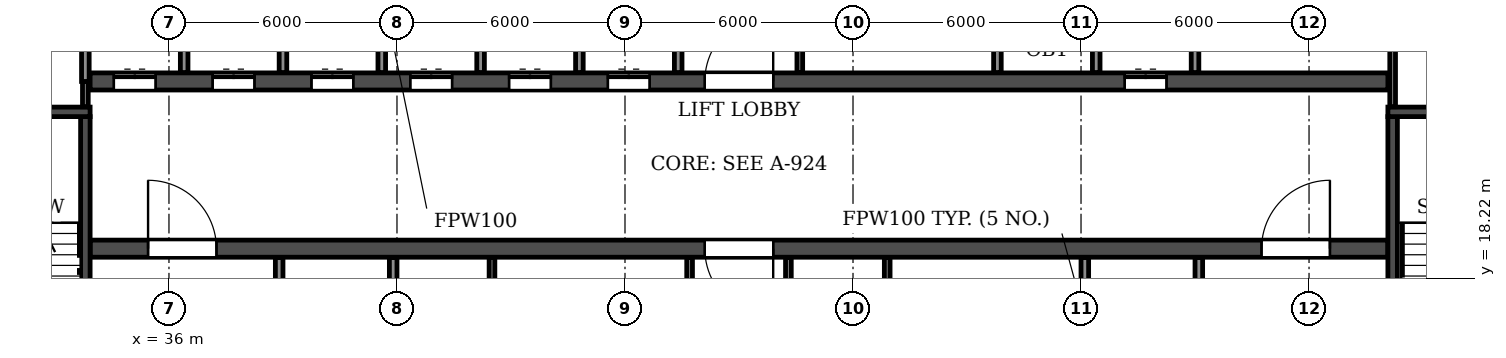
"""IFC4 building model, lengths in metres.
Left out: names, types, materials, properties, quantities, classifications, styles, units other than length and angle.
Written with IfcOpenShell. Run it as: python <this file> out.ifc"""

import sys

from ifc_helpers import new_model, si_unit, direction, frame, frame_2d, origin, place, context, subcontext, project, spatial, rectangle, extrude, element, fill, save


model = new_model("IFC4")
c1 = context("Model", 3, precision=1e-05, world=origin(), true_north=direction((0.0, 1.0)))
c2 = subcontext(c1, "Body", "Model", "MODEL_VIEW")
j1 = project(units=[si_unit("LENGTHUNIT", "METRE"), si_unit("PLANEANGLEUNIT", "RADIAN")], contexts=[c1])
p1 = place(None, origin())
s1 = spatial("IfcSite", under=j1, at=p1, CompositionType="ELEMENT")
p2 = place(p1, origin())
s2 = spatial("IfcBuilding", under=s1, at=p2, CompositionType="ELEMENT")
p3 = place(p2, frame((0.0, 0.0, 125.7)))
s3 = spatial("IfcBuildingStorey", under=s2, at=p3, CompositionType="ELEMENT", Elevation=125.7)
p4 = place(p3, frame((33.925, 19.0, 0.0), z_axis=(0.0, 0.0, 1.0), x_axis=(1.0, 0.0, 0.0)))
e1 = element("IfcWall", 1, at=p4, inside=s3, PredefinedType="SOLIDWALL", context=c2, shape_type="SweptSolid", body=[
    extrude(rectangle(XDim=34.15, YDim=0.45, at=frame_2d((17.075, 0.0))), origin(), (0.0, 0.0, 1.0), 3.07),
])
p5 = place(p4, frame((16.175, 0.0, 0.0)))
e2 = element("IfcOpeningElement", 2, at=p5, cuts=e1, PredefinedType="OPENING", context=c2, shape_type="SweptSolid", body=[
    extrude(rectangle(XDim=1.8, YDim=2.1, at=frame_2d((0.9, 1.05))), frame((0.0, 0.235, 0.0), z_axis=(0.0, -1.0, 0.0), x_axis=(1.0, 0.0, 0.0)), (0.0, 0.0, 1.0), 0.47),
])
p6 = place(p4, frame((1.525, 0.0, 0.0)))
e3 = element("IfcOpeningElement", 3, at=p6, cuts=e1, PredefinedType="OPENING", context=c2, shape_type="SweptSolid", body=[
    extrude(rectangle(XDim=1.8, YDim=2.1, at=frame_2d((0.9, 1.05))), frame((0.0, 0.235, 0.0), z_axis=(0.0, -1.0, 0.0), x_axis=(1.0, 0.0, 0.0)), (0.0, 0.0, 1.0), 0.47),
])
p7 = place(p4, frame((30.825, 0.0, 0.0)))
e4 = element("IfcOpeningElement", 4, at=p7, cuts=e1, PredefinedType="OPENING", context=c2, shape_type="SweptSolid", body=[
    extrude(rectangle(XDim=1.8, YDim=2.1, at=frame_2d((0.9, 1.05))), frame((0.0, 0.235, 0.0), z_axis=(0.0, -1.0, 0.0), x_axis=(1.0, 0.0, 0.0)), (0.0, 0.0, 1.0), 0.47),
])
p8 = place(p3, frame((33.925, 23.4, 0.0), z_axis=(0.0, 0.0, 1.0), x_axis=(1.0, 0.0, 0.0)))
e5 = element("IfcWall", 5, at=p8, inside=s3, PredefinedType="SOLIDWALL", context=c2, shape_type="SweptSolid", body=[
    extrude(rectangle(XDim=34.15, YDim=0.45, at=frame_2d((17.075, 0.0))), origin(), (0.0, 0.0, 1.0), 3.07),
])
p9 = place(p8, frame((16.175, 0.0, 0.0)))
e6 = element("IfcOpeningElement", 6, at=p9, cuts=e5, PredefinedType="OPENING", context=c2, shape_type="SweptSolid", body=[
    extrude(rectangle(XDim=1.8, YDim=2.1, at=frame_2d((0.9, 1.05))), frame((0.0, 0.235, 0.0), z_axis=(0.0, -1.0, 0.0), x_axis=(1.0, 0.0, 0.0)), (0.0, 0.0, 1.0), 0.47),
])
p10 = place(p8, frame((0.625, 0.0, 0.0)))
e7 = element("IfcOpeningElement", 7, at=p10, cuts=e5, PredefinedType="OPENING", context=c2, shape_type="SweptSolid", body=[
    extrude(rectangle(XDim=1.1, YDim=2.1, at=frame_2d((0.55, 1.05))), frame((0.0, 0.235, 0.0), z_axis=(0.0, -1.0, 0.0), x_axis=(1.0, 0.0, 0.0)), (0.0, 0.0, 1.0), 0.47),
])
p11 = place(p8, frame((3.225, 0.0, 0.0)))
e8 = element("IfcOpeningElement", 8, at=p11, cuts=e5, PredefinedType="OPENING", context=c2, shape_type="SweptSolid", body=[
    extrude(rectangle(XDim=1.1, YDim=2.1, at=frame_2d((0.55, 1.05))), frame((0.0, 0.235, 0.0), z_axis=(0.0, -1.0, 0.0), x_axis=(1.0, 0.0, 0.0)), (0.0, 0.0, 1.0), 0.47),
])
p12 = place(p8, frame((5.825, 0.0, 0.0)))
e9 = element("IfcOpeningElement", 9, at=p12, cuts=e5, PredefinedType="OPENING", context=c2, shape_type="SweptSolid", body=[
    extrude(rectangle(XDim=1.1, YDim=2.1, at=frame_2d((0.55, 1.05))), frame((0.0, 0.235, 0.0), z_axis=(0.0, -1.0, 0.0), x_axis=(1.0, 0.0, 0.0)), (0.0, 0.0, 1.0), 0.47),
])
p13 = place(p8, frame((8.425, 0.0, 0.0)))
e10 = element("IfcOpeningElement", 10, at=p13, cuts=e5, PredefinedType="OPENING", context=c2, shape_type="SweptSolid", body=[
    extrude(rectangle(XDim=1.1, YDim=2.1, at=frame_2d((0.55, 1.05))), frame((0.0, 0.235, 0.0), z_axis=(0.0, -1.0, 0.0), x_axis=(1.0, 0.0, 0.0)), (0.0, 0.0, 1.0), 0.47),
])
p14 = place(p8, frame((11.025, 0.0, 0.0)))
e11 = element("IfcOpeningElement", 11, at=p14, cuts=e5, PredefinedType="OPENING", context=c2, shape_type="SweptSolid", body=[
    extrude(rectangle(XDim=1.1, YDim=2.1, at=frame_2d((0.55, 1.05))), frame((0.0, 0.235, 0.0), z_axis=(0.0, -1.0, 0.0), x_axis=(1.0, 0.0, 0.0)), (0.0, 0.0, 1.0), 0.47),
])
p15 = place(p8, frame((13.625, 0.0, 0.0)))
e12 = element("IfcOpeningElement", 12, at=p15, cuts=e5, PredefinedType="OPENING", context=c2, shape_type="SweptSolid", body=[
    extrude(rectangle(XDim=1.1, YDim=2.1, at=frame_2d((0.55, 1.05))), frame((0.0, 0.235, 0.0), z_axis=(0.0, -1.0, 0.0), x_axis=(1.0, 0.0, 0.0)), (0.0, 0.0, 1.0), 0.47),
])
p16 = place(p8, frame((27.225, 0.0, 0.0)))
e13 = element("IfcOpeningElement", 13, at=p16, cuts=e5, PredefinedType="OPENING", context=c2, shape_type="SweptSolid", body=[
    extrude(rectangle(XDim=1.1, YDim=2.1, at=frame_2d((0.55, 1.05))), frame((0.0, 0.235, 0.0), z_axis=(0.0, -1.0, 0.0), x_axis=(1.0, 0.0, 0.0)), (0.0, 0.0, 1.0), 0.47),
])
p17 = place(p3, frame((33.8, 14.825, 0.0), z_axis=(0.0, 0.0, 1.0), x_axis=(0.0, 1.0, 0.0)))
e14 = element("IfcWall", 14, at=p17, inside=s3, PredefinedType="SOLIDWALL", context=c2, shape_type="SweptSolid", body=[
    extrude(rectangle(XDim=7.65, YDim=0.25, at=frame_2d((3.825, 0.0))), origin(), (0.0, 0.0, 1.0), 3.07),
])
p18 = place(p17, frame((0.475, 0.0, 0.0)))
e15 = element("IfcOpeningElement", 15, at=p18, cuts=e14, PredefinedType="OPENING", context=c2, shape_type="SweptSolid", body=[
    extrude(rectangle(XDim=1.0, YDim=2.1, at=frame_2d((0.5, 1.05))), frame((0.0, 0.135, 0.0), z_axis=(0.0, -1.0, 0.0), x_axis=(1.0, 0.0, 0.0)), (0.0, 0.0, 1.0), 0.27),
])
p19 = place(p3, frame((29.875, 22.6, 0.0), z_axis=(0.0, 0.0, 1.0), x_axis=(1.0, 0.0, 0.0)))
e16 = element("IfcWall", 16, at=p19, inside=s3, PredefinedType="SOLIDWALL", context=c2, shape_type="SweptSolid", body=[
    extrude(rectangle(XDim=4.05, YDim=0.25, at=frame_2d((2.025, 0.0))), origin(), (0.0, 0.0, 1.0), 3.07),
])
p20 = place(p3, frame((68.2, 14.825, 0.0), z_axis=(0.0, 0.0, 1.0), x_axis=(0.0, 1.0, 0.0)))
e17 = element("IfcWall", 17, at=p20, inside=s3, PredefinedType="SOLIDWALL", context=c2, shape_type="SweptSolid", body=[
    extrude(rectangle(XDim=7.65, YDim=0.25, at=frame_2d((3.825, 0.0))), origin(), (0.0, 0.0, 1.0), 3.07),
])
p21 = place(p20, frame((0.475, 0.0, 0.0)))
e18 = element("IfcOpeningElement", 18, at=p21, cuts=e17, PredefinedType="OPENING", context=c2, shape_type="SweptSolid", body=[
    extrude(rectangle(XDim=1.0, YDim=2.1, at=frame_2d((0.5, 1.05))), frame((0.0, 0.135, 0.0), z_axis=(0.0, -1.0, 0.0), x_axis=(1.0, 0.0, 0.0)), (0.0, 0.0, 1.0), 0.27),
])
p22 = place(p3, frame((68.075, 22.6, 0.0), z_axis=(0.0, 0.0, 1.0), x_axis=(1.0, 0.0, 0.0)))
e19 = element("IfcWall", 19, at=p22, inside=s3, PredefinedType="SOLIDWALL", context=c2, shape_type="SweptSolid", body=[
    extrude(rectangle(XDim=4.05, YDim=0.25, at=frame_2d((2.025, 0.0))), origin(), (0.0, 0.0, 1.0), 3.07),
])
for number, where, z_axis, x_axis in (
    (20, (49.7, 14.835, 0.0), (0.0, 0.0, 1.0), (0.0, 1.0, 0.0)),
    (21, (52.3, 14.835, 0.0), (0.0, 0.0, 1.0), (0.0, 1.0, 0.0)),
    (22, (52.6, 23.635, 0.0), (0.0, 0.0, 1.0), (0.0, 1.0, 0.0)),
    (23, (44.5, 14.835, 0.0), (0.0, 0.0, 1.0), (0.0, 1.0, 0.0)),
    (24, (54.9, 14.835, 0.0), (0.0, 0.0, 1.0), (0.0, 1.0, 0.0)),
):
    element("IfcWall", number, at=place(p3, frame(where, z_axis=z_axis, x_axis=x_axis)), inside=s3, PredefinedType="PARTITIONING", context=c2, shape_type="SweptSolid", body=[
        extrude(rectangle(XDim=3.93, YDim=0.15, at=frame_2d((1.965, 0.0))), origin(), (0.0, 0.0, 1.0), 3.07),
    ])
p23 = place(p3, frame((33.8, 22.735, 0.0), z_axis=(0.0, 0.0, 1.0), x_axis=(0.0, 1.0, 0.0)))
e25 = element("IfcWall", 25, at=p23, inside=s3, PredefinedType="PARTITIONING", context=c2, shape_type="SweptSolid", body=[
    extrude(rectangle(XDim=0.665, YDim=0.15, at=frame_2d((0.333, 0.0))), origin(), (0.0, 0.0, 1.0), 3.07),
])
p24 = place(p3, frame((68.2, 22.735, 0.0), z_axis=(0.0, 0.0, 1.0), x_axis=(0.0, 1.0, 0.0)))
e26 = element("IfcWall", 26, at=p24, inside=s3, PredefinedType="PARTITIONING", context=c2, shape_type="SweptSolid", body=[
    extrude(rectangle(XDim=4.83, YDim=0.15, at=frame_2d((2.415, 0.0))), origin(), (0.0, 0.0, 1.0), 3.07),
])
p25 = place(p3, frame((33.8, 23.4, 0.0), z_axis=(0.0, 0.0, 1.0), x_axis=(0.0, 1.0, 0.0)))
e27 = element("IfcWall", 27, at=p25, inside=s3, PredefinedType="PARTITIONING", context=c2, shape_type="SweptSolid", body=[
    extrude(rectangle(XDim=2.7, YDim=0.2, at=frame_2d((1.35, 0.0))), origin(), (0.0, 0.0, 1.0), 3.07),
])
p26 = place(p3, frame((36.4, 23.635, 0.0), z_axis=(0.0, 0.0, 1.0), x_axis=(0.0, 1.0, 0.0)))
e28 = element("IfcWall", 28, at=p26, inside=s3, PredefinedType="PARTITIONING", context=c2, shape_type="SweptSolid", body=[
    extrude(rectangle(XDim=2.465, YDim=0.2, at=frame_2d((1.232, 0.0))), origin(), (0.0, 0.0, 1.0), 3.07),
])
p27 = place(p3, frame((38.9, 14.835, 0.0), z_axis=(0.0, 0.0, 1.0), x_axis=(0.0, 1.0, 0.0)))
e29 = element("IfcWall", 29, at=p27, inside=s3, PredefinedType="PARTITIONING", context=c2, shape_type="SweptSolid", body=[
    extrude(rectangle(XDim=3.93, YDim=0.2, at=frame_2d((1.965, 0.0))), origin(), (0.0, 0.0, 1.0), 3.07),
])
p28 = place(p27, frame((1.415, 0.0, 0.0)))
e30 = element("IfcOpeningElement", 30, at=p28, cuts=e29, PredefinedType="OPENING", context=c2, shape_type="SweptSolid", body=[
    extrude(rectangle(XDim=1.1, YDim=2.1, at=frame_2d((0.55, 1.05))), frame((0.0, 0.11, 0.0), z_axis=(0.0, -1.0, 0.0), x_axis=(1.0, 0.0, 0.0)), (0.0, 0.0, 1.0), 0.22),
])
for number, where, z_axis, x_axis in (
    (31, (39.0, 23.635, 0.0), (0.0, 0.0, 1.0), (0.0, 1.0, 0.0)),
    (32, (41.6, 23.635, 0.0), (0.0, 0.0, 1.0), (0.0, 1.0, 0.0)),
):
    element("IfcWall", number, at=place(p3, frame(where, z_axis=z_axis, x_axis=x_axis)), inside=s3, PredefinedType="PARTITIONING", context=c2, shape_type="SweptSolid", body=[
        extrude(rectangle(XDim=2.465, YDim=0.2, at=frame_2d((1.232, 0.0))), origin(), (0.0, 0.0, 1.0), 3.07),
    ])
for number, where, z_axis, x_axis in (
    (33, (41.9, 14.835, 0.0), (0.0, 0.0, 1.0), (0.0, 1.0, 0.0)),
    (34, (44.2, 23.635, 0.0), (0.0, 0.0, 1.0), (0.0, 1.0, 0.0)),
    (35, (46.8, 23.635, 0.0), (0.0, 0.0, 1.0), (0.0, 1.0, 0.0)),
):
    element("IfcWall", number, at=place(p3, frame(where, z_axis=z_axis, x_axis=x_axis)), inside=s3, PredefinedType="PARTITIONING", context=c2, shape_type="SweptSolid", body=[
        extrude(rectangle(XDim=3.93, YDim=0.2, at=frame_2d((1.965, 0.0))), origin(), (0.0, 0.0, 1.0), 3.07),
    ])
for number, where, z_axis, x_axis in (
    (36, (49.4, 23.635, 0.0), (0.0, 0.0, 1.0), (0.0, 1.0, 0.0)),
    (37, (57.8, 23.635, 0.0), (0.0, 0.0, 1.0), (0.0, 1.0, 0.0)),
):
    element("IfcWall", number, at=place(p3, frame(where, z_axis=z_axis, x_axis=x_axis)), inside=s3, PredefinedType="PARTITIONING", context=c2, shape_type="SweptSolid", body=[
        extrude(rectangle(XDim=2.465, YDim=0.2, at=frame_2d((1.232, 0.0))), origin(), (0.0, 0.0, 1.0), 3.07),
    ])
p29 = place(p3, frame((60.1, 14.835, 0.0), z_axis=(0.0, 0.0, 1.0), x_axis=(0.0, 1.0, 0.0)))
e38 = element("IfcWall", 38, at=p29, inside=s3, PredefinedType="PARTITIONING", context=c2, shape_type="SweptSolid", body=[
    extrude(rectangle(XDim=3.93, YDim=0.2, at=frame_2d((1.965, 0.0))), origin(), (0.0, 0.0, 1.0), 3.07),
])
for number, where, z_axis, x_axis in (
    (39, (60.4, 23.635, 0.0), (0.0, 0.0, 1.0), (0.0, 1.0, 0.0)),
    (40, (63.0, 23.635, 0.0), (0.0, 0.0, 1.0), (0.0, 1.0, 0.0)),
):
    element("IfcWall", number, at=place(p3, frame(where, z_axis=z_axis, x_axis=x_axis)), inside=s3, PredefinedType="PARTITIONING", context=c2, shape_type="SweptSolid", body=[
        extrude(rectangle(XDim=2.465, YDim=0.2, at=frame_2d((1.232, 0.0))), origin(), (0.0, 0.0, 1.0), 3.07),
    ])
p30 = place(p3, frame((63.1, 14.835, 0.0), z_axis=(0.0, 0.0, 1.0), x_axis=(0.0, 1.0, 0.0)))
e41 = element("IfcWall", 41, at=p30, inside=s3, PredefinedType="PARTITIONING", context=c2, shape_type="SweptSolid", body=[
    extrude(rectangle(XDim=3.93, YDim=0.2, at=frame_2d((1.965, 0.0))), origin(), (0.0, 0.0, 1.0), 3.07),
])
p31 = place(p30, frame((1.415, 0.0, 0.0)))
e42 = element("IfcOpeningElement", 42, at=p31, cuts=e41, PredefinedType="OPENING", context=c2, shape_type="SweptSolid", body=[
    extrude(rectangle(XDim=1.1, YDim=2.1, at=frame_2d((0.55, 1.05))), frame((0.0, 0.11, 0.0), z_axis=(0.0, -1.0, 0.0), x_axis=(1.0, 0.0, 0.0)), (0.0, 0.0, 1.0), 0.22),
])
p32 = place(p9, origin())
e43 = element("IfcDoor", 43, at=p32, inside=s3, OperationType="DOUBLE_DOOR_SINGLE_SWING", PredefinedType="DOOR", context=c2, shape_type="SweptSolid", body=[
    extrude(rectangle(XDim=1.8, YDim=2.1, at=frame_2d((0.9, 1.05))), frame((0.0, 0.025, 0.0), z_axis=(0.0, -1.0, 0.0), x_axis=(1.0, 0.0, 0.0)), (0.0, 0.0, 1.0), 0.05),
])
fill(e6, e43)
p33 = place(p5, frame((1.8, 0.0, 0.0), z_axis=(0.0, 0.0, 1.0), x_axis=(-1.0, 0.0, 0.0)))
e44 = element("IfcDoor", 44, at=p33, inside=s3, OperationType="DOUBLE_DOOR_SINGLE_SWING", PredefinedType="DOOR", context=c2, shape_type="SweptSolid", body=[
    extrude(rectangle(XDim=1.8, YDim=2.1, at=frame_2d((0.9, 1.05))), frame((0.0, 0.025, 0.0), z_axis=(0.0, -1.0, 0.0), x_axis=(1.0, 0.0, 0.0)), (0.0, 0.0, 1.0), 0.05),
])
fill(e2, e44)
p34 = place(p10, origin())
e45 = element("IfcDoor", 45, at=p34, inside=s3, OperationType="DOUBLE_DOOR_SLIDING", PredefinedType="DOOR", context=c2, shape_type="SweptSolid", body=[
    extrude(rectangle(XDim=1.1, YDim=2.1, at=frame_2d((0.55, 1.05))), frame((0.0, 0.025, 0.0), z_axis=(0.0, -1.0, 0.0), x_axis=(1.0, 0.0, 0.0)), (0.0, 0.0, 1.0), 0.05),
])
fill(e7, e45)
p35 = place(p6, origin())
e46 = element("IfcDoor", 46, at=p35, inside=s3, OperationType="DOUBLE_DOOR_SINGLE_SWING", PredefinedType="DOOR", context=c2, shape_type="SweptSolid", body=[
    extrude(rectangle(XDim=1.8, YDim=2.1, at=frame_2d((0.9, 1.05))), frame((0.0, 0.025, 0.0), z_axis=(0.0, -1.0, 0.0), x_axis=(1.0, 0.0, 0.0)), (0.0, 0.0, 1.0), 0.05),
])
fill(e3, e46)
p36 = place(p11, origin())
e47 = element("IfcDoor", 47, at=p36, inside=s3, OperationType="DOUBLE_DOOR_SLIDING", PredefinedType="DOOR", context=c2, shape_type="SweptSolid", body=[
    extrude(rectangle(XDim=1.1, YDim=2.1, at=frame_2d((0.55, 1.05))), frame((0.0, 0.025, 0.0), z_axis=(0.0, -1.0, 0.0), x_axis=(1.0, 0.0, 0.0)), (0.0, 0.0, 1.0), 0.05),
])
fill(e8, e47)
p37 = place(p12, origin())
e48 = element("IfcDoor", 48, at=p37, inside=s3, OperationType="DOUBLE_DOOR_SLIDING", PredefinedType="DOOR", context=c2, shape_type="SweptSolid", body=[
    extrude(rectangle(XDim=1.1, YDim=2.1, at=frame_2d((0.55, 1.05))), frame((0.0, 0.025, 0.0), z_axis=(0.0, -1.0, 0.0), x_axis=(1.0, 0.0, 0.0)), (0.0, 0.0, 1.0), 0.05),
])
fill(e9, e48)
p38 = place(p13, origin())
e49 = element("IfcDoor", 49, at=p38, inside=s3, OperationType="DOUBLE_DOOR_SLIDING", PredefinedType="DOOR", context=c2, shape_type="SweptSolid", body=[
    extrude(rectangle(XDim=1.1, YDim=2.1, at=frame_2d((0.55, 1.05))), frame((0.0, 0.025, 0.0), z_axis=(0.0, -1.0, 0.0), x_axis=(1.0, 0.0, 0.0)), (0.0, 0.0, 1.0), 0.05),
])
fill(e10, e49)
p39 = place(p14, origin())
e50 = element("IfcDoor", 50, at=p39, inside=s3, OperationType="DOUBLE_DOOR_SLIDING", PredefinedType="DOOR", context=c2, shape_type="SweptSolid", body=[
    extrude(rectangle(XDim=1.1, YDim=2.1, at=frame_2d((0.55, 1.05))), frame((0.0, 0.025, 0.0), z_axis=(0.0, -1.0, 0.0), x_axis=(1.0, 0.0, 0.0)), (0.0, 0.0, 1.0), 0.05),
])
fill(e11, e50)
p40 = place(p15, origin())
e51 = element("IfcDoor", 51, at=p40, inside=s3, OperationType="DOUBLE_DOOR_SLIDING", PredefinedType="DOOR", context=c2, shape_type="SweptSolid", body=[
    extrude(rectangle(XDim=1.1, YDim=2.1, at=frame_2d((0.55, 1.05))), frame((0.0, 0.025, 0.0), z_axis=(0.0, -1.0, 0.0), x_axis=(1.0, 0.0, 0.0)), (0.0, 0.0, 1.0), 0.05),
])
fill(e12, e51)
p41 = place(p16, origin())
e52 = element("IfcDoor", 52, at=p41, inside=s3, OperationType="DOUBLE_DOOR_SLIDING", PredefinedType="DOOR", context=c2, shape_type="SweptSolid", body=[
    extrude(rectangle(XDim=1.1, YDim=2.1, at=frame_2d((0.55, 1.05))), frame((0.0, 0.025, 0.0), z_axis=(0.0, -1.0, 0.0), x_axis=(1.0, 0.0, 0.0)), (0.0, 0.0, 1.0), 0.05),
])
fill(e13, e52)
p42 = place(p7, origin())
e53 = element("IfcDoor", 53, at=p42, inside=s3, OperationType="DOUBLE_DOOR_SINGLE_SWING", PredefinedType="DOOR", context=c2, shape_type="SweptSolid", body=[
    extrude(rectangle(XDim=1.8, YDim=2.1, at=frame_2d((0.9, 1.05))), frame((0.0, 0.025, 0.0), z_axis=(0.0, -1.0, 0.0), x_axis=(1.0, 0.0, 0.0)), (0.0, 0.0, 1.0), 0.05),
])
fill(e4, e53)
save(model, sys.argv[1])
